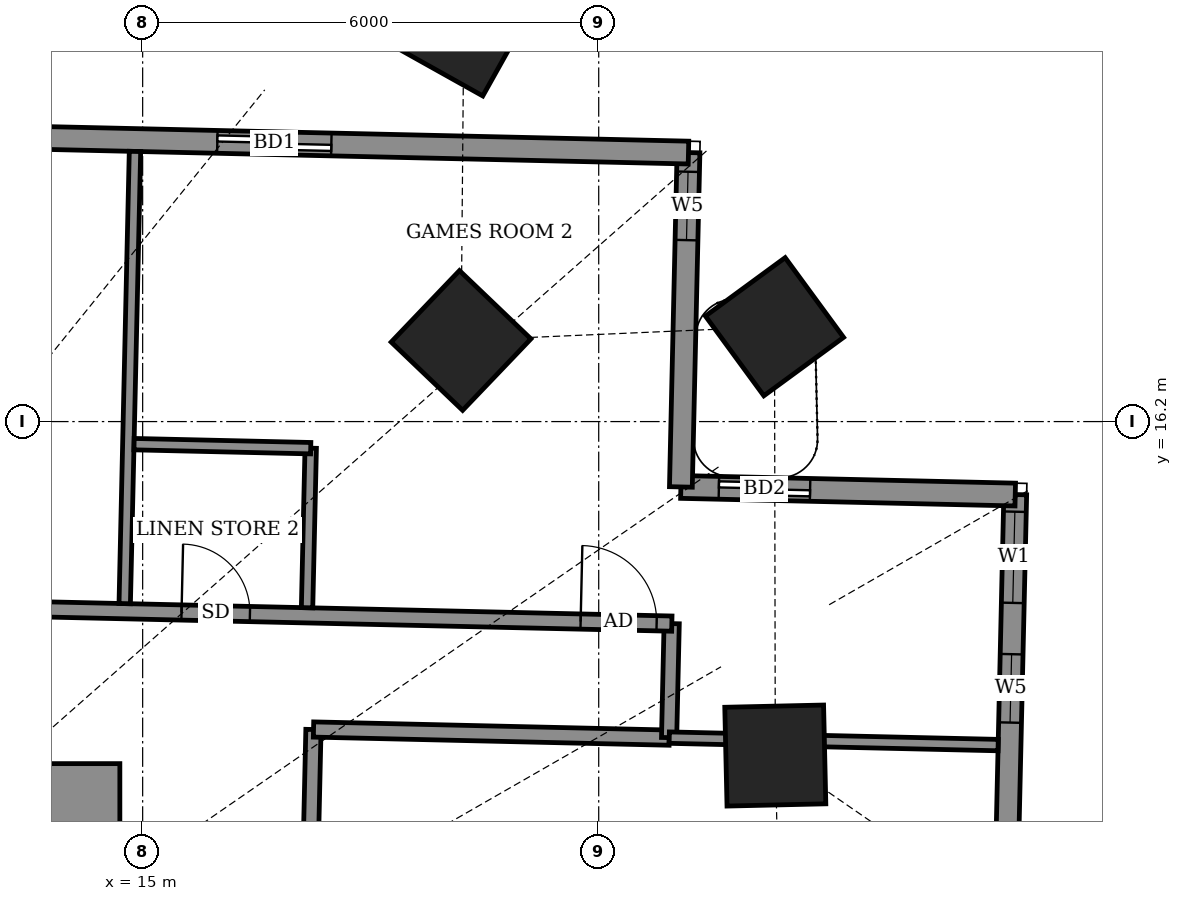
"""IFC4 building model, lengths in metres.
Left out: names, types, materials, properties, quantities, classifications, styles, units other than length and angle.
Written with IfcOpenShell. Run it as: python <this file> out.ifc"""

import sys

from ifc_helpers import new_model, si_unit, direction, frame, frame_2d, origin, origin_2d, place, context, subcontext, project, spatial, rectangle, extrude, element, fill, save


model = new_model("IFC4")
c1 = context("Model", 3, precision=1e-05, world=origin(), true_north=direction((0.0, 1.0)))
c2 = subcontext(c1, "Body", "Model", "MODEL_VIEW")
j1 = project(units=[si_unit("LENGTHUNIT", "METRE"), si_unit("PLANEANGLEUNIT", "RADIAN")], contexts=[c1])
p1 = place(None, origin())
s1 = spatial("IfcSite", under=j1, at=p1, CompositionType="ELEMENT")
p2 = place(p1, origin())
s2 = spatial("IfcBuilding", under=s1, at=p2, CompositionType="ELEMENT")
p3 = place(p2, frame((0.0, 0.0, 148.1)))
s3 = spatial("IfcBuildingStorey", under=s2, at=p3, CompositionType="ELEMENT", Elevation=148.1)
for number, where, z_axis, x_axis in (
    (1, (23.323, 11.806, -0.55), (0.0, 0.0, 1.0), (-0.023, 1.0, 0.0)),
    (2, (23.313, 17.448, -0.55), (0.0, 0.0, 1.0), (-0.591, 0.807, 0.0)),
    (3, (19.189, 17.267, -0.55), (0.0, 0.0, 1.0), (-0.723, 0.691, 0.0)),
    (4, (19.225, 21.369, -0.55), (0.0, 0.0, 1.0), (-0.873, 0.488, 0.0)),
):
    element("IfcColumn", number, at=place(p3, frame(where, z_axis=z_axis, x_axis=x_axis)), inside=s3, PredefinedType="COLUMN", context=c2, shape_type="SweptSolid", body=[
        extrude(rectangle(XDim=1.3, YDim=1.3, at=origin_2d()), origin(), (0.0, 0.0, 1.0), 4.6),
    ])
p4 = place(p3, frame((26.238, 4.613, 0.0), z_axis=(0.0, 0.0, 1.0), x_axis=(0.022761056451, 0.999740933597, 0.0)))
e5 = element("IfcWall", 5, at=p4, inside=s3, PredefinedType="SOLIDWALL", context=c2, shape_type="SweptSolid", body=[
    extrude(rectangle(XDim=10.63, YDim=0.3, at=frame_2d((5.315, 0.0))), origin(), (0.0, 0.0, 1.0), 2.85),
])
p5 = place(p4, frame((4.522, 0.0, 0.0)))
e6 = element("IfcOpeningElement", 6, at=p5, cuts=e5, PredefinedType="OPENING", context=c2, shape_type="SweptSolid", body=[
    extrude(rectangle(XDim=1.5, YDim=2.4, at=frame_2d((0.75, 1.2))), frame((0.0, 0.16, 0.0), z_axis=(0.0, -1.0, 0.0), x_axis=(1.0, 0.0, 0.0)), (0.0, 0.0, 1.0), 0.32),
])
p6 = place(p4, frame((7.629, 0.0, 0.9)))
e7 = element("IfcOpeningElement", 7, at=p6, cuts=e5, PredefinedType="OPENING", context=c2, shape_type="SweptSolid", body=[
    extrude(rectangle(XDim=0.9, YDim=1.5, at=frame_2d((0.45, 0.75))), frame((0.0, 0.16, 0.0), z_axis=(0.0, -1.0, 0.0), x_axis=(1.0, 0.0, 0.0)), (0.0, 0.0, 1.0), 0.32),
])
p7 = place(p4, frame((9.204, 0.0, 0.9)))
e8 = element("IfcOpeningElement", 8, at=p7, cuts=e5, PredefinedType="OPENING", context=c2, shape_type="SweptSolid", body=[
    extrude(rectangle(XDim=1.2, YDim=1.5, at=frame_2d((0.6, 0.75))), frame((0.0, 0.16, 0.0), z_axis=(0.0, -1.0, 0.0), x_axis=(1.0, 0.0, 0.0)), (0.0, 0.0, 1.0), 0.32),
])
p8 = place(p3, frame((26.48, 15.24, 0.0), z_axis=(0.0, 0.0, 1.0), x_axis=(-0.999741204967, 0.022749133868, 0.0)))
e9 = element("IfcWall", 9, at=p8, inside=s3, PredefinedType="SOLIDWALL", context=c2, shape_type="SweptSolid", body=[
    extrude(rectangle(XDim=4.4, YDim=0.3, at=frame_2d((2.2, 0.0))), origin(), (0.0, 0.0, 1.0), 2.75),
])
p9 = place(p8, frame((2.7, 0.0, 0.0)))
e10 = element("IfcOpeningElement", 10, at=p9, cuts=e9, PredefinedType="OPENING", context=c2, shape_type="SweptSolid", body=[
    extrude(rectangle(XDim=1.2, YDim=2.4, at=frame_2d((0.6, 1.2))), frame((0.0, 0.16, 0.0), z_axis=(0.0, -1.0, 0.0), x_axis=(1.0, 0.0, 0.0)), (0.0, 0.0, 1.0), 0.32),
])
p10 = place(p3, frame((22.081, 15.34, 0.0), z_axis=(0.0, 0.0, 1.0), x_axis=(0.022693676786, 0.999742465355, 0.0)))
e11 = element("IfcWall", 11, at=p10, inside=s3, PredefinedType="SOLIDWALL", context=c2, shape_type="SweptSolid", body=[
    extrude(rectangle(XDim=4.4, YDim=0.3, at=frame_2d((2.2, 0.0))), origin(), (0.0, 0.0, 1.0), 2.75),
])
p11 = place(p10, frame((3.248, 0.0, 0.9)))
e12 = element("IfcOpeningElement", 12, at=p11, cuts=e11, PredefinedType="OPENING", context=c2, shape_type="SweptSolid", body=[
    extrude(rectangle(XDim=0.9, YDim=1.5, at=frame_2d((0.45, 0.75))), frame((0.0, 0.16, 0.0), z_axis=(0.0, -1.0, 0.0), x_axis=(1.0, 0.0, 0.0)), (0.0, 0.0, 1.0), 0.32),
])
p12 = place(p3, frame((22.181, 19.739, 0.0), z_axis=(0.0, 0.0, 1.0), x_axis=(-0.999742618326, 0.022686936846, 0.0)))
e13 = element("IfcWall", 13, at=p12, inside=s3, PredefinedType="SOLIDWALL", context=c2, shape_type="SweptSolid", body=[
    extrude(rectangle(XDim=39.58, YDim=0.3, at=frame_2d((19.79, 0.0))), origin(), (0.0, 0.0, 1.0), 2.75),
])
p13 = place(p12, frame((4.7, 0.0, 0.0)))
e14 = element("IfcOpeningElement", 14, at=p13, cuts=e13, PredefinedType="OPENING", context=c2, shape_type="SweptSolid", body=[
    extrude(rectangle(XDim=1.5, YDim=2.4, at=frame_2d((0.75, 1.2))), frame((0.0, 0.16, 0.0), z_axis=(0.0, -1.0, 0.0), x_axis=(1.0, 0.0, 0.0)), (0.0, 0.0, 1.0), 0.32),
])
p14 = place(p12, frame((11.092, 0.0, 0.9)))
e15 = element("IfcOpeningElement", 15, at=p14, cuts=e13, PredefinedType="OPENING", context=c2, shape_type="SweptSolid", body=[
    extrude(rectangle(XDim=1.2, YDim=1.5, at=frame_2d((0.6, 0.75))), frame((0.0, 0.16, 0.0), z_axis=(0.0, -1.0, 0.0), x_axis=(1.0, 0.0, 0.0)), (0.0, 0.0, 1.0), 0.32),
])
p15 = place(p12, frame((13.571, 0.0, 0.9)))
e16 = element("IfcOpeningElement", 16, at=p15, cuts=e13, PredefinedType="OPENING", context=c2, shape_type="SweptSolid", body=[
    extrude(rectangle(XDim=2.4, YDim=1.5, at=frame_2d((1.2, 0.75))), frame((0.0, 0.16, 0.0), z_axis=(0.0, -1.0, 0.0), x_axis=(1.0, 0.0, 0.0)), (0.0, 0.0, 1.0), 0.32),
])
p16 = place(p12, frame((20.604, 0.0, 0.0)))
e17 = element("IfcOpeningElement", 17, at=p16, cuts=e13, PredefinedType="OPENING", context=c2, shape_type="SweptSolid", body=[
    extrude(rectangle(XDim=1.5, YDim=2.4, at=frame_2d((0.75, 1.2))), frame((0.0, 0.16, 0.0), z_axis=(0.0, -1.0, 0.0), x_axis=(1.0, 0.0, 0.0)), (0.0, 0.0, 1.0), 0.32),
])
p17 = place(p12, frame((26.366, 0.0, 0.9)))
e18 = element("IfcOpeningElement", 18, at=p17, cuts=e13, PredefinedType="OPENING", context=c2, shape_type="SweptSolid", body=[
    extrude(rectangle(XDim=2.4, YDim=1.5, at=frame_2d((1.2, 0.75))), frame((0.0, 0.16, 0.0), z_axis=(0.0, -1.0, 0.0), x_axis=(1.0, 0.0, 0.0)), (0.0, 0.0, 1.0), 0.32),
])
p18 = place(p12, frame((33.482, 0.0, 0.9)))
e19 = element("IfcOpeningElement", 19, at=p18, cuts=e13, PredefinedType="OPENING", context=c2, shape_type="SweptSolid", body=[
    extrude(rectangle(XDim=2.4, YDim=1.5, at=frame_2d((1.2, 0.75))), frame((0.0, 0.16, 0.0), z_axis=(0.0, -1.0, 0.0), x_axis=(1.0, 0.0, 0.0)), (0.0, 0.0, 1.0), 0.32),
])
p19 = place(p3, frame((17.149, 7.832, 0.0), z_axis=(0.0, 0.0, 1.0), x_axis=(0.022729111383, 0.999741660378, 0.0)))
e20 = element("IfcWall", 20, at=p19, inside=s3, PredefinedType="PARTITIONING", context=c2, shape_type="SweptSolid", body=[
    extrude(rectangle(XDim=4.318, YDim=0.2, at=frame_2d((2.159, 0.0))), origin(), (0.0, 0.0, 1.0), 2.85),
])
p20 = place(p19, frame((1.761, 0.0, 0.0)))
e21 = element("IfcOpeningElement", 21, at=p20, cuts=e20, PredefinedType="OPENING", context=c2, shape_type="SweptSolid", body=[
    extrude(rectangle(XDim=1.0, YDim=2.1, at=frame_2d((0.5, 1.05))), frame((0.0, 0.11, 0.0), z_axis=(0.0, -1.0, 0.0), x_axis=(1.0, 0.0, 0.0)), (0.0, 0.0, 1.0), 0.22),
])
p21 = place(p3, frame((17.248, 12.149, 0.0), z_axis=(0.0, 0.0, 1.0), x_axis=(0.999739054811, -0.022843429809, 0.0)))
e22 = element("IfcWall", 22, at=p21, inside=s3, PredefinedType="PARTITIONING", context=c2, shape_type="SweptSolid", body=[
    extrude(rectangle(XDim=4.681, YDim=0.2, at=frame_2d((2.341, 0.0))), origin(), (0.0, 0.0, 1.0), 2.85),
])
p22 = place(p3, frame((21.926, 12.042, 0.0), z_axis=(0.0, 0.0, 1.0), x_axis=(0.022617910375, 0.999744182344, 0.0)))
e23 = element("IfcWall", 23, at=p22, inside=s3, PredefinedType="PARTITIONING", context=c2, shape_type="SweptSolid", body=[
    extrude(rectangle(XDim=1.5, YDim=0.2, at=frame_2d((0.75, 0.0))), origin(), (0.0, 0.0, 1.0), 2.85),
])
p23 = place(p3, frame((21.928, 12.042, 0.0), z_axis=(0.0, 0.0, 1.0), x_axis=(0.999744131062, -0.022620176977, 0.0)))
e24 = element("IfcWall", 24, at=p23, inside=s3, PredefinedType="PARTITIONING", context=c2, shape_type="SweptSolid", body=[
    extrude(rectangle(XDim=4.328, YDim=0.15, at=frame_2d((2.164, 0.0))), origin(), (0.0, 0.0, 1.0), 2.85),
])
p24 = place(p3, frame((-21.279, 14.523, 0.0), z_axis=(0.0, 0.0, 1.0), x_axis=(0.999742775939, -0.022679990253, 0.0)))
e25 = element("IfcWall", 25, at=p24, inside=s3, PredefinedType="PARTITIONING", context=c2, shape_type="SweptSolid", body=[
    extrude(rectangle(XDim=43.252, YDim=0.2, at=frame_2d((21.626, 0.0))), origin(), (0.0, 0.0, 1.0), 2.75),
])
p25 = place(p24, frame((42.052, 0.0, 0.0)))
e26 = element("IfcOpeningElement", 26, at=p25, cuts=e25, PredefinedType="OPENING", context=c2, shape_type="SweptSolid", body=[
    extrude(rectangle(XDim=1.0, YDim=2.1, at=frame_2d((0.5, 1.05))), frame((0.0, 0.11, 0.0), z_axis=(0.0, -1.0, 0.0), x_axis=(1.0, 0.0, 0.0)), (0.0, 0.0, 1.0), 0.22),
])
p26 = place(p24, frame((36.8, 0.0, 0.0)))
e27 = element("IfcOpeningElement", 27, at=p26, cuts=e25, PredefinedType="OPENING", context=c2, shape_type="SweptSolid", body=[
    extrude(rectangle(XDim=0.9, YDim=2.1, at=frame_2d((0.45, 1.05))), frame((0.0, 0.11, 0.0), z_axis=(0.0, -1.0, 0.0), x_axis=(1.0, 0.0, 0.0)), (0.0, 0.0, 1.0), 0.22),
])
p27 = place(p24, frame((32.625, 0.0, 0.0)))
e28 = element("IfcOpeningElement", 28, at=p27, cuts=e25, PredefinedType="OPENING", context=c2, shape_type="SweptSolid", body=[
    extrude(rectangle(XDim=1.0, YDim=2.1, at=frame_2d((0.5, 1.05))), frame((0.0, 0.11, 0.0), z_axis=(0.0, -1.0, 0.0), x_axis=(1.0, 0.0, 0.0)), (0.0, 0.0, 1.0), 0.22),
])
p28 = place(p24, frame((27.9, 0.0, 0.0)))
e29 = element("IfcOpeningElement", 29, at=p28, cuts=e25, PredefinedType="OPENING", context=c2, shape_type="SweptSolid", body=[
    extrude(rectangle(XDim=1.0, YDim=2.1, at=frame_2d((0.5, 1.05))), frame((0.0, 0.11, 0.0), z_axis=(0.0, -1.0, 0.0), x_axis=(1.0, 0.0, 0.0)), (0.0, 0.0, 1.0), 0.22),
])
p29 = place(p24, frame((24.95, 0.0, 0.0)))
e30 = element("IfcOpeningElement", 30, at=p29, cuts=e25, PredefinedType="OPENING", context=c2, shape_type="SweptSolid", body=[
    extrude(rectangle(XDim=0.9, YDim=2.1, at=frame_2d((0.45, 1.05))), frame((0.0, 0.11, 0.0), z_axis=(0.0, -1.0, 0.0), x_axis=(1.0, 0.0, 0.0)), (0.0, 0.0, 1.0), 0.22),
])
p30 = place(p24, frame((20.075, 0.0, 0.0)))
e31 = element("IfcOpeningElement", 31, at=p30, cuts=e25, PredefinedType="OPENING", context=c2, shape_type="SweptSolid", body=[
    extrude(rectangle(XDim=0.9, YDim=2.1, at=frame_2d((0.45, 1.05))), frame((0.0, 0.11, 0.0), z_axis=(0.0, -1.0, 0.0), x_axis=(1.0, 0.0, 0.0)), (0.0, 0.0, 1.0), 0.22),
])
p31 = place(p24, frame((16.25, 0.0, 0.0)))
e32 = element("IfcOpeningElement", 32, at=p31, cuts=e25, PredefinedType="OPENING", context=c2, shape_type="SweptSolid", body=[
    extrude(rectangle(XDim=1.0, YDim=2.1, at=frame_2d((0.5, 1.05))), frame((0.0, 0.11, 0.0), z_axis=(0.0, -1.0, 0.0), x_axis=(1.0, 0.0, 0.0)), (0.0, 0.0, 1.0), 0.22),
])
p32 = place(p24, frame((12.6, 0.0, 0.0)))
e33 = element("IfcOpeningElement", 33, at=p32, cuts=e25, PredefinedType="OPENING", context=c2, shape_type="SweptSolid", body=[
    extrude(rectangle(XDim=0.9, YDim=2.1, at=frame_2d((0.45, 1.05))), frame((0.0, 0.11, 0.0), z_axis=(0.0, -1.0, 0.0), x_axis=(1.0, 0.0, 0.0)), (0.0, 0.0, 1.0), 0.22),
])
p33 = place(p24, frame((3.525, 0.0, 0.0)))
e34 = element("IfcOpeningElement", 34, at=p33, cuts=e25, PredefinedType="OPENING", context=c2, shape_type="SweptSolid", body=[
    extrude(rectangle(XDim=1.0, YDim=2.1, at=frame_2d((0.5, 1.05))), frame((0.0, 0.11, 0.0), z_axis=(0.0, -1.0, 0.0), x_axis=(1.0, 0.0, 0.0)), (0.0, 0.0, 1.0), 0.22),
])
p34 = place(p24, frame((10.2, 0.0, 0.0)))
e35 = element("IfcOpeningElement", 35, at=p34, cuts=e25, PredefinedType="OPENING", context=c2, shape_type="SweptSolid", body=[
    extrude(rectangle(XDim=0.9, YDim=2.1, at=frame_2d((0.45, 1.05))), frame((0.0, 0.11, 0.0), z_axis=(0.0, -1.0, 0.0), x_axis=(1.0, 0.0, 0.0)), (0.0, 0.0, 1.0), 0.22),
])
p35 = place(p3, frame((14.764, 13.805, 0.0), z_axis=(0.0, 0.0, 1.0), x_axis=(0.022688785847, 0.999742576365, 0.0)))
e36 = element("IfcWall", 36, at=p35, inside=s3, PredefinedType="PARTITIONING", context=c2, shape_type="SweptSolid", body=[
    extrude(rectangle(XDim=5.95, YDim=0.15, at=frame_2d((2.975, 0.0))), origin(), (0.0, 0.0, 1.0), 2.85),
])
p36 = place(p3, frame((17.163, 13.751, 0.0), z_axis=(0.0, 0.0, 1.0), x_axis=(0.02279007832, 0.999740272436, 0.0)))
e37 = element("IfcWall", 37, at=p36, inside=s3, PredefinedType="PARTITIONING", context=c2, shape_type="SweptSolid", body=[
    extrude(rectangle(XDim=2.1, YDim=0.15, at=frame_2d((1.05, 0.0))), origin(), (0.0, 0.0, 1.0), 2.85),
])
p37 = place(p3, frame((14.887, 15.903, 0.0), z_axis=(0.0, 0.0, 1.0), x_axis=(0.999740260747, -0.02279059109, 0.0)))
e38 = element("IfcWall", 38, at=p37, inside=s3, PredefinedType="PARTITIONING", context=c2, shape_type="SweptSolid", body=[
    extrude(rectangle(XDim=2.324, YDim=0.15, at=frame_2d((1.162, 0.0))), origin(), (0.0, 0.0, 1.0), 2.85),
])
p38 = place(p3, frame((-14.7, 11.25, 0.0), z_axis=(0.0, 0.0, 1.0), x_axis=(1.0, 0.0, 0.0)))
e39 = element("IfcWall", 39, at=p38, inside=s3, PredefinedType="SHEAR", context=c2, shape_type="SweptSolid", body=[
    extrude(rectangle(XDim=29.4, YDim=0.9, at=frame_2d((14.7, 0.0))), origin(), (0.0, 0.0, 1.0), 4.6),
])
p39 = place(p6, origin())
e40 = element("IfcWindow", 40, at=p39, inside=s3, PartitioningType="SINGLE_PANEL", PredefinedType="WINDOW", context=c2, shape_type="SweptSolid", body=[
    extrude(rectangle(XDim=0.9, YDim=1.5, at=frame_2d((0.45, 0.75))), frame((0.0, 0.03, 0.0), z_axis=(0.0, -1.0, 0.0), x_axis=(1.0, 0.0, 0.0)), (0.0, 0.0, 1.0), 0.06),
])
fill(e7, e40)
p40 = place(p7, origin())
e41 = element("IfcWindow", 41, at=p40, inside=s3, PartitioningType="SINGLE_PANEL", PredefinedType="WINDOW", context=c2, shape_type="SweptSolid", body=[
    extrude(rectangle(XDim=1.2, YDim=1.5, at=frame_2d((0.6, 0.75))), frame((0.0, 0.03, 0.0), z_axis=(0.0, -1.0, 0.0), x_axis=(1.0, 0.0, 0.0)), (0.0, 0.0, 1.0), 0.06),
])
fill(e8, e41)
p41 = place(p9, origin())
e42 = element("IfcDoor", 42, at=p41, inside=s3, OperationType="SLIDING_TO_LEFT", PredefinedType="DOOR", context=c2, shape_type="SweptSolid", body=[
    extrude(rectangle(XDim=1.2, YDim=2.4, at=frame_2d((0.6, 1.2))), frame((0.0, 0.025, 0.0), z_axis=(0.0, -1.0, 0.0), x_axis=(1.0, 0.0, 0.0)), (0.0, 0.0, 1.0), 0.05),
])
fill(e10, e42)
p42 = place(p11, origin())
e43 = element("IfcWindow", 43, at=p42, inside=s3, PartitioningType="SINGLE_PANEL", PredefinedType="WINDOW", context=c2, shape_type="SweptSolid", body=[
    extrude(rectangle(XDim=0.9, YDim=1.5, at=frame_2d((0.45, 0.75))), frame((0.0, 0.03, 0.0), z_axis=(0.0, -1.0, 0.0), x_axis=(1.0, 0.0, 0.0)), (0.0, 0.0, 1.0), 0.06),
])
fill(e12, e43)
p43 = place(p13, origin())
e44 = element("IfcDoor", 44, at=p43, inside=s3, OperationType="SLIDING_TO_LEFT", PredefinedType="DOOR", context=c2, shape_type="SweptSolid", body=[
    extrude(rectangle(XDim=1.5, YDim=2.4, at=frame_2d((0.75, 1.2))), frame((0.0, 0.025, 0.0), z_axis=(0.0, -1.0, 0.0), x_axis=(1.0, 0.0, 0.0)), (0.0, 0.0, 1.0), 0.05),
])
fill(e14, e44)
p44 = place(p25, origin())
e45 = element("IfcDoor", 45, at=p44, inside=s3, OperationType="SINGLE_SWING_RIGHT", PredefinedType="DOOR", context=c2, shape_type="SweptSolid", body=[
    extrude(rectangle(XDim=1.0, YDim=2.1, at=frame_2d((0.5, 1.05))), frame((0.0, 0.025, 0.0), z_axis=(0.0, -1.0, 0.0), x_axis=(1.0, 0.0, 0.0)), (0.0, 0.0, 1.0), 0.05),
])
fill(e26, e45)
p45 = place(p26, origin())
e46 = element("IfcDoor", 46, at=p45, inside=s3, OperationType="SINGLE_SWING_LEFT", PredefinedType="DOOR", context=c2, shape_type="SweptSolid", body=[
    extrude(rectangle(XDim=0.9, YDim=2.1, at=frame_2d((0.45, 1.05))), frame((0.0, 0.025, 0.0), z_axis=(0.0, -1.0, 0.0), x_axis=(1.0, 0.0, 0.0)), (0.0, 0.0, 1.0), 0.05),
])
fill(e27, e46)
save(model, sys.argv[1])
